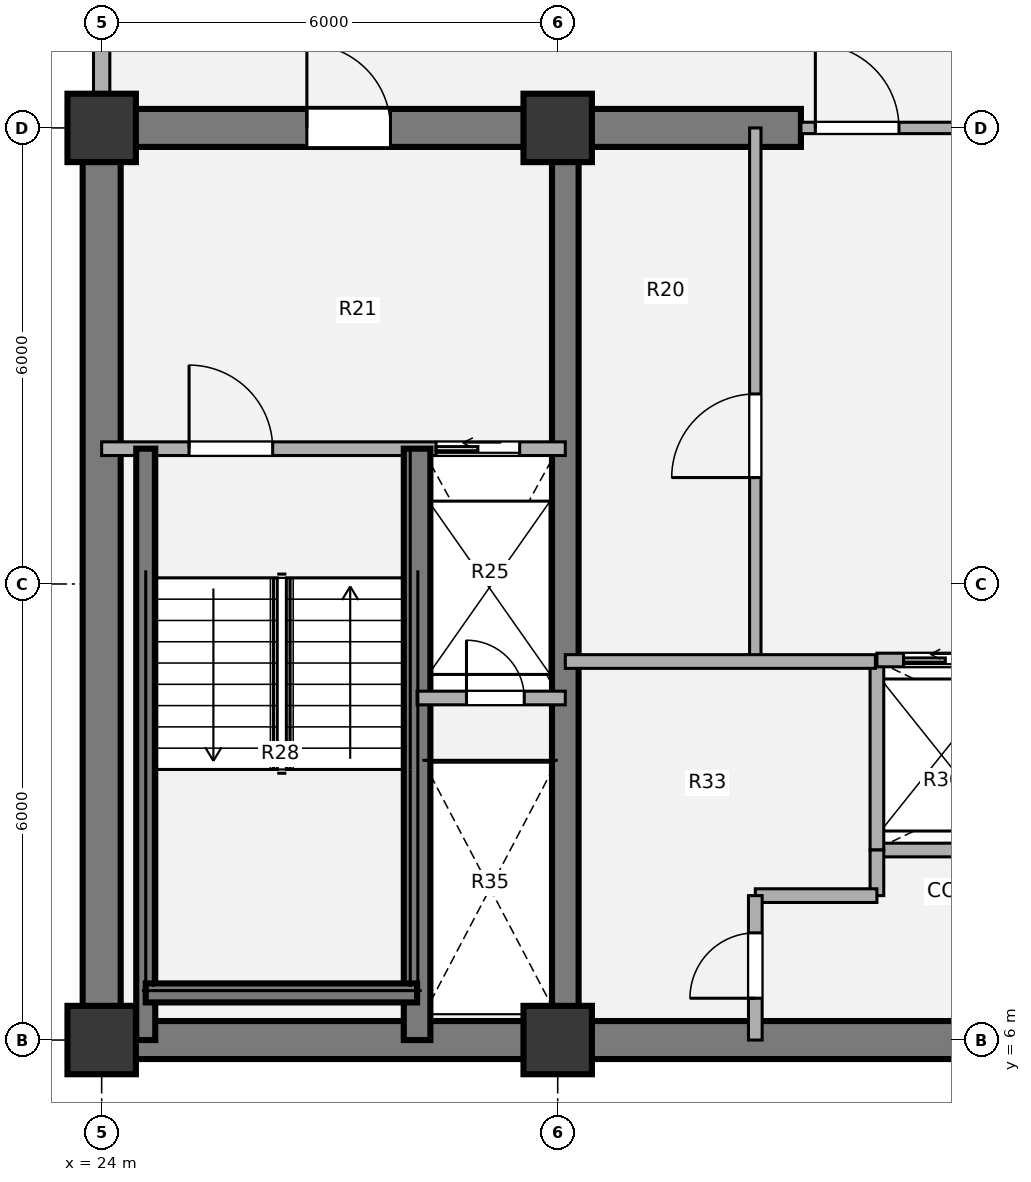
"""IFC4 building model, lengths in metres.
Left out: names, types, materials, properties, quantities, classifications, styles, units other than length and angle.
Written with IfcOpenShell. Run it as: python <this file> out.ifc"""

import sys

from ifc_helpers import new_model, si_unit, direction, frame, frame_2d, origin, origin_2d, place, context, subcontext, project, spatial, rectangle, extrude, source, transform, mapped, element, fill, save


model = new_model("IFC4")
c1 = context("Model", 3, precision=1e-05, world=origin(), true_north=direction((0.0, 1.0)))
c2 = subcontext(c1, "Body", "Model", "MODEL_VIEW")
j1 = project(units=[si_unit("LENGTHUNIT", "METRE"), si_unit("PLANEANGLEUNIT", "RADIAN")], contexts=[c1])
p1 = place(None, origin())
s1 = spatial("IfcSite", under=j1, at=p1, CompositionType="ELEMENT")
p2 = place(p1, origin())
s2 = spatial("IfcBuilding", under=s1, at=p2, CompositionType="ELEMENT")
p3 = place(p2, frame((0.0, 0.0, 104.94)))
s3 = spatial("IfcBuildingStorey", under=s2, at=p3, CompositionType="ELEMENT", Elevation=104.94)
m1 = source(origin(), c2, "Body", "SweptSolid", [
    extrude(rectangle(XDim=0.9, YDim=0.9, at=origin_2d()), origin(), (0.0, 0.0, 1.0), 3.78),
])
for number, where, z_axis, x_axis in (
    (1, (24.0, 6.0, 0.0), (0.0, 0.0, 1.0), (1.0, 0.0, 0.0)),
    (2, (30.0, 6.0, 0.0), (0.0, 0.0, 1.0), (1.0, 0.0, 0.0)),
    (3, (24.0, 18.0, 0.0), (0.0, 0.0, 1.0), (1.0, 0.0, 0.0)),
    (4, (30.0, 18.0, 0.0), (0.0, 0.0, 1.0), (1.0, 0.0, 0.0)),
):
    element("IfcColumn", number, at=place(p3, frame(where, z_axis=z_axis, x_axis=x_axis)), inside=s3, PredefinedType="COLUMN", context=c2, shape_type="MappedRepresentation", body=[
        mapped(m1, transform((0.0, 0.0, 0.0), x_axis=(1.0, 0.0, 0.0), y_axis=(0.0, 1.0, 0.0), z_axis=(0.0, 0.0, 1.0), scale=1.0)),
    ])
p4 = place(p3, frame((48.25, 6.0, 0.0), z_axis=(0.0, 0.0, 1.0), x_axis=(-1.0, 0.0, 0.0)))
e5 = element("IfcWall", 5, at=p4, inside=s3, PredefinedType="SHEAR", context=c2, shape_type="SweptSolid", body=[
    extrude(rectangle(XDim=24.5, YDim=0.5, at=frame_2d((12.25, 0.0))), origin(), (0.0, 0.0, 1.0), 3.78),
])
p5 = place(p3, frame((24.0, 6.0, 0.0), z_axis=(0.0, 0.0, 1.0), x_axis=(0.0, 1.0, 0.0)))
e6 = element("IfcWall", 6, at=p5, inside=s3, PredefinedType="SHEAR", context=c2, shape_type="SweptSolid", body=[
    extrude(rectangle(XDim=12.0, YDim=0.5, at=frame_2d((6.0, 0.0))), origin(), (0.0, 0.0, 1.0), 3.78),
])
p6 = place(p3, frame((23.75, 18.0, 0.0), z_axis=(0.0, 0.0, 1.0), x_axis=(1.0, 0.0, 0.0)))
e7 = element("IfcWall", 7, at=p6, inside=s3, PredefinedType="SHEAR", context=c2, shape_type="SweptSolid", body=[
    extrude(rectangle(XDim=9.45, YDim=0.5, at=frame_2d((4.725, 0.0))), origin(), (0.0, 0.0, 1.0), 3.78),
])
p7 = place(p6, frame((2.95, 0.0, 0.0)))
e8 = element("IfcOpeningElement", 8, at=p7, cuts=e7, PredefinedType="OPENING", context=c2, shape_type="SweptSolid", body=[
    extrude(rectangle(XDim=1.1, YDim=2.1, at=origin_2d()), frame((0.55, 0.26, 1.05), z_axis=(0.0, -1.0, 0.0), x_axis=(1.0, 0.0, 0.0)), (0.0, 0.0, 1.0), 0.52),
])
p8 = place(p3, frame((30.1, 6.0, 0.0), z_axis=(0.0, 0.0, 1.0), x_axis=(0.0, 1.0, 0.0)))
e9 = element("IfcWall", 9, at=p8, inside=s3, PredefinedType="SHEAR", context=c2, shape_type="SweptSolid", body=[
    extrude(rectangle(XDim=12.0, YDim=0.35, at=frame_2d((6.0, 0.0))), origin(), (0.0, 0.0, 1.0), 3.78),
])
p9 = place(p3, frame((24.0, 18.43, 0.0), z_axis=(0.0, 0.0, 1.0), x_axis=(0.0, 1.0, 0.0)))
e10 = element("IfcWall", 10, at=p9, inside=s3, PredefinedType="SOLIDWALL", context=c2, shape_type="SweptSolid", body=[
    extrude(rectangle(XDim=2.62, YDim=0.215, at=frame_2d((1.31, 0.0))), origin(), (0.0, 0.0, 1.0), 3.53),
])
p10 = place(p3, frame((32.6, 11.0, 0.0), z_axis=(0.0, 0.0, 1.0), x_axis=(0.0, 1.0, 0.0)))
e11 = element("IfcWall", 11, at=p10, inside=s3, PredefinedType="PARTITIONING", context=c2, shape_type="SweptSolid", body=[
    extrude(rectangle(XDim=7.0, YDim=0.15, at=frame_2d((3.5, 0.0))), origin(), (0.0, 0.0, 1.0), 3.5),
])
p11 = place(p10, frame((2.4, 0.0, 0.0)))
e12 = element("IfcOpeningElement", 12, at=p11, cuts=e11, PredefinedType="OPENING", context=c2, shape_type="SweptSolid", body=[
    extrude(rectangle(XDim=1.1, YDim=2.1, at=origin_2d()), frame((0.55, 0.085, 1.05), z_axis=(0.0, -1.0, 0.0), x_axis=(1.0, 0.0, 0.0)), (0.0, 0.0, 1.0), 0.17),
])
p12 = place(p3, frame((34.2, 8.5, 0.0), z_axis=(0.0, 0.0, 1.0), x_axis=(1.0, 0.0, 0.0)))
e13 = element("IfcWall", 13, at=p12, inside=s3, PredefinedType="PARTITIONING", context=c2, shape_type="SweptSolid", body=[
    extrude(rectangle(XDim=5.15, YDim=0.18, at=frame_2d((2.575, 0.0))), origin(), (0.0, 0.0, 1.0), 3.5),
])
p13 = place(p3, frame((34.2, 8.5, 0.0), z_axis=(0.0, 0.0, 1.0), x_axis=(0.0, 1.0, 0.0)))
e14 = element("IfcWall", 14, at=p13, inside=s3, PredefinedType="PARTITIONING", context=c2, shape_type="SweptSolid", body=[
    extrude(rectangle(XDim=2.5, YDim=0.18, at=frame_2d((1.25, 0.0))), origin(), (0.0, 0.0, 1.0), 3.5),
])
p14 = place(p3, frame((30.1, 10.98, 0.0), z_axis=(0.0, 0.0, 1.0), x_axis=(1.0, 0.0, 0.0)))
e15 = element("IfcWall", 15, at=p14, inside=s3, PredefinedType="PARTITIONING", context=c2, shape_type="SweptSolid", body=[
    extrude(rectangle(XDim=4.08, YDim=0.18, at=frame_2d((2.04, 0.0))), origin(), (0.0, 0.0, 1.0), 3.5),
])
p15 = place(p3, frame((34.2, 7.9, 0.0), z_axis=(0.0, 0.0, 1.0), x_axis=(0.0, 1.0, 0.0)))
e16 = element("IfcWall", 16, at=p15, inside=s3, PredefinedType="PARTITIONING", context=c2, shape_type="SweptSolid", body=[
    extrude(rectangle(XDim=0.6, YDim=0.18, at=frame_2d((0.3, 0.0))), origin(), (0.0, 0.0, 1.0), 3.5),
])
p16 = place(p3, frame((32.6, 7.9, 0.0), z_axis=(0.0, 0.0, 1.0), x_axis=(1.0, 0.0, 0.0)))
e17 = element("IfcWall", 17, at=p16, inside=s3, PredefinedType="PARTITIONING", context=c2, shape_type="SweptSolid", body=[
    extrude(rectangle(XDim=1.6, YDim=0.18, at=frame_2d((0.8, 0.0))), origin(), (0.0, 0.0, 1.0), 3.5),
])
p17 = place(p3, frame((32.6, 6.0, 0.0), z_axis=(0.0, 0.0, 1.0), x_axis=(0.0, 1.0, 0.0)))
e18 = element("IfcWall", 18, at=p17, inside=s3, PredefinedType="PARTITIONING", context=c2, shape_type="SweptSolid", body=[
    extrude(rectangle(XDim=1.9, YDim=0.18, at=frame_2d((0.95, 0.0))), origin(), (0.0, 0.0, 1.0), 3.5),
])
p18 = place(p17, frame((0.55, 0.0, 0.0)))
e19 = element("IfcOpeningElement", 19, at=p18, cuts=e18, PredefinedType="OPENING", context=c2, shape_type="SweptSolid", body=[
    extrude(rectangle(XDim=0.86, YDim=2.1, at=origin_2d()), frame((0.43, 0.1, 1.05), z_axis=(0.0, -1.0, 0.0), x_axis=(1.0, 0.0, 0.0)), (0.0, 0.0, 1.0), 0.2),
])
p19 = place(p3, frame((33.2, 18.0, 0.0), z_axis=(0.0, 0.0, 1.0), x_axis=(1.0, 0.0, 0.0)))
e20 = element("IfcWall", 20, at=p19, inside=s3, PredefinedType="PARTITIONING", context=c2, shape_type="SweptSolid", body=[
    extrude(rectangle(XDim=5.6, YDim=0.15, at=frame_2d((2.8, 0.0))), origin(), (0.0, 0.0, 1.0), 2.315),
])
p20 = place(p19, frame((0.19, 0.0, 0.0)))
e21 = element("IfcOpeningElement", 21, at=p20, cuts=e20, PredefinedType="OPENING", context=c2, shape_type="SweptSolid", body=[
    extrude(rectangle(XDim=1.1, YDim=2.1, at=origin_2d()), frame((0.55, 0.085, 1.05), z_axis=(0.0, -1.0, 0.0), x_axis=(1.0, 0.0, 0.0)), (0.0, 0.0, 1.0), 0.17),
])
p21 = place(p19, frame((4.31, 0.0, 0.0)))
e22 = element("IfcOpeningElement", 22, at=p21, cuts=e20, PredefinedType="OPENING", context=c2, shape_type="SweptSolid", body=[
    extrude(rectangle(XDim=1.1, YDim=2.1, at=origin_2d()), frame((0.55, 0.085, 1.05), z_axis=(0.0, -1.0, 0.0), x_axis=(1.0, 0.0, 0.0)), (0.0, 0.0, 1.0), 0.17),
])
p22 = place(p3, frame((24.0, 13.78, 0.0), z_axis=(0.0, 0.0, 1.0), x_axis=(1.0, 0.0, 0.0)))
e23 = element("IfcWall", 23, at=p22, inside=s3, PredefinedType="PARTITIONING", context=c2, shape_type="SweptSolid", body=[
    extrude(rectangle(XDim=6.1, YDim=0.18, at=frame_2d((3.05, 0.0))), origin(), (0.0, 0.0, 1.0), 3.5),
])
p23 = place(p22, frame((1.15, 0.0, 0.0)))
e24 = element("IfcOpeningElement", 24, at=p23, cuts=e23, PredefinedType="OPENING", context=c2, shape_type="SweptSolid", body=[
    extrude(rectangle(XDim=1.1, YDim=2.1, at=origin_2d()), frame((0.55, 0.1, 1.05), z_axis=(0.0, -1.0, 0.0), x_axis=(1.0, 0.0, 0.0)), (0.0, 0.0, 1.0), 0.2),
])
p24 = place(p22, frame((4.4, 0.0, 0.0)))
e25 = element("IfcOpeningElement", 25, at=p24, cuts=e23, PredefinedType="OPENING", context=c2, shape_type="SweptSolid", body=[
    extrude(rectangle(XDim=1.1, YDim=2.1, at=origin_2d()), frame((0.55, 0.1, 1.05), z_axis=(0.0, -1.0, 0.0), x_axis=(1.0, 0.0, 0.0)), (0.0, 0.0, 1.0), 0.2),
])
p25 = place(p3, frame((28.15, 6.0, 0.0), z_axis=(0.0, 0.0, 1.0), x_axis=(0.0, 1.0, 0.0)))
e26 = element("IfcWall", 26, at=p25, inside=s3, PredefinedType="SHEAR", context=c2, shape_type="SweptSolid", body=[
    extrude(rectangle(XDim=7.78, YDim=0.35, at=frame_2d((3.89, 0.0))), origin(), (0.0, 0.0, 1.0), 3.85),
])
p26 = place(p3, frame((24.58, 6.0, 0.0), z_axis=(0.0, 0.0, 1.0), x_axis=(0.0, 1.0, 0.0)))
e27 = element("IfcWall", 27, at=p26, inside=s3, PredefinedType="SHEAR", context=c2, shape_type="SweptSolid", body=[
    extrude(rectangle(XDim=7.78, YDim=0.25, at=frame_2d((3.89, 0.0))), origin(), (0.0, 0.0, 1.0), 3.85),
])
p27 = place(p3, frame((24.58, 6.62, 0.0), z_axis=(0.0, 0.0, 1.0), x_axis=(1.0, 0.0, 0.0)))
e28 = element("IfcWall", 28, at=p27, inside=s3, PredefinedType="SHEAR", context=c2, shape_type="SweptSolid", body=[
    extrude(rectangle(XDim=3.57, YDim=0.25, at=frame_2d((1.785, 0.0))), origin(), (0.0, 0.0, 1.0), 3.85),
])
p28 = place(p3, frame((28.15, 10.5, 0.0), z_axis=(0.0, 0.0, 1.0), x_axis=(1.0, 0.0, 0.0)))
e29 = element("IfcWall", 29, at=p28, inside=s3, PredefinedType="PARTITIONING", context=c2, shape_type="SweptSolid", body=[
    extrude(rectangle(XDim=1.95, YDim=0.18, at=frame_2d((0.975, 0.0))), origin(), (0.0, 0.0, 1.0), 3.5),
])
p29 = place(p28, frame((0.65, 0.0, 0.0)))
e30 = element("IfcOpeningElement", 30, at=p29, cuts=e29, PredefinedType="OPENING", context=c2, shape_type="SweptSolid", body=[
    extrude(rectangle(XDim=0.76, YDim=2.05, at=origin_2d()), frame((0.38, 0.1, 1.025), z_axis=(0.0, -1.0, 0.0), x_axis=(1.0, 0.0, 0.0)), (0.0, 0.0, 1.0), 0.2),
])
p30 = place(p3, frame((34.2, 11.0, 0.0), z_axis=(0.0, 0.0, 1.0), x_axis=(1.0, 0.0, 0.0)))
e31 = element("IfcWall", 31, at=p30, inside=s3, PredefinedType="PARTITIONING", context=c2, shape_type="SweptSolid", body=[
    extrude(rectangle(XDim=5.15, YDim=0.18, at=frame_2d((2.575, 0.0))), origin(), (0.0, 0.0, 1.0), 3.5),
])
p31 = place(p30, frame((0.35, 0.0, 0.0)))
e32 = element("IfcOpeningElement", 32, at=p31, cuts=e31, PredefinedType="OPENING", context=c2, shape_type="SweptSolid", body=[
    extrude(rectangle(XDim=1.1, YDim=2.1, at=origin_2d()), frame((0.55, 0.1, 1.05), z_axis=(0.0, -1.0, 0.0), x_axis=(1.0, 0.0, 0.0)), (0.0, 0.0, 1.0), 0.2),
])
p32 = place(p30, frame((2.05, 0.0, 0.0)))
e33 = element("IfcOpeningElement", 33, at=p32, cuts=e31, PredefinedType="OPENING", context=c2, shape_type="SweptSolid", body=[
    extrude(rectangle(XDim=1.1, YDim=2.1, at=origin_2d()), frame((0.55, 0.1, 1.05), z_axis=(0.0, -1.0, 0.0), x_axis=(1.0, 0.0, 0.0)), (0.0, 0.0, 1.0), 0.2),
])
p33 = place(p30, frame((3.7, 0.0, 0.0)))
e34 = element("IfcOpeningElement", 34, at=p33, cuts=e31, PredefinedType="OPENING", context=c2, shape_type="SweptSolid", body=[
    extrude(rectangle(XDim=1.1, YDim=2.1, at=origin_2d()), frame((0.55, 0.1, 1.05), z_axis=(0.0, -1.0, 0.0), x_axis=(1.0, 0.0, 0.0)), (0.0, 0.0, 1.0), 0.2),
])
m2 = source(origin(), c2, "Body", "SweptSolid", [
    extrude(rectangle(XDim=1.1, YDim=2.1, at=origin_2d()), frame((0.55, 0.025, 1.05), z_axis=(0.0, -1.0, 0.0), x_axis=(1.0, 0.0, 0.0)), (0.0, 0.0, 1.0), 0.05),
])
p34 = place(p11, origin())
e35 = element("IfcDoor", 35, at=p34, inside=s3, OperationType="SINGLE_SWING_LEFT", PredefinedType="DOOR", context=c2, shape_type="MappedRepresentation", body=[
    mapped(m2, transform((0.0, 0.0, 0.0), x_axis=(1.0, 0.0, 0.0), y_axis=(0.0, 1.0, 0.0), z_axis=(0.0, 0.0, 1.0), scale=1.0)),
])
fill(e12, e35)
m3 = source(origin(), c2, "Body", "SweptSolid", [
    extrude(rectangle(XDim=0.86, YDim=2.1, at=origin_2d()), frame((0.43, 0.025, 1.05), z_axis=(0.0, -1.0, 0.0), x_axis=(1.0, 0.0, 0.0)), (0.0, 0.0, 1.0), 0.05),
])
p35 = place(p18, origin())
e36 = element("IfcDoor", 36, at=p35, inside=s3, OperationType="SINGLE_SWING_LEFT", PredefinedType="DOOR", context=c2, shape_type="MappedRepresentation", body=[
    mapped(m3, transform((0.0, 0.0, 0.0), x_axis=(1.0, 0.0, 0.0), y_axis=(0.0, 1.0, 0.0), z_axis=(0.0, 0.0, 1.0), scale=1.0)),
])
fill(e19, e36)
m4 = source(origin(), c2, "Body", "SweptSolid", [
    extrude(rectangle(XDim=1.1, YDim=2.1, at=origin_2d()), frame((0.55, 0.025, 1.05), z_axis=(0.0, -1.0, 0.0), x_axis=(1.0, 0.0, 0.0)), (0.0, 0.0, 1.0), 0.05),
])
p36 = place(p20, origin())
e37 = element("IfcDoor", 37, at=p36, inside=s3, OperationType="SINGLE_SWING_LEFT", PredefinedType="DOOR", context=c2, shape_type="MappedRepresentation", body=[
    mapped(m4, transform((0.0, 0.0, 0.0), x_axis=(1.0, 0.0, 0.0), y_axis=(0.0, 1.0, 0.0), z_axis=(0.0, 0.0, 1.0), scale=1.0)),
])
fill(e21, e37)
m5 = source(origin(), c2, "Body", "SweptSolid", [
    extrude(rectangle(XDim=1.1, YDim=2.1, at=origin_2d()), frame((0.55, 0.025, 1.05), z_axis=(0.0, -1.0, 0.0), x_axis=(1.0, 0.0, 0.0)), (0.0, 0.0, 1.0), 0.05),
])
p37 = place(p23, origin())
e38 = element("IfcDoor", 38, at=p37, inside=s3, OperationType="SINGLE_SWING_LEFT", PredefinedType="DOOR", context=c2, shape_type="MappedRepresentation", body=[
    mapped(m5, transform((0.0, 0.0, 0.0), x_axis=(1.0, 0.0, 0.0), y_axis=(0.0, 1.0, 0.0), z_axis=(0.0, 0.0, 1.0), scale=1.0)),
])
fill(e24, e38)
m6 = source(origin(), c2, "Body", "SweptSolid", [
    extrude(rectangle(XDim=1.1, YDim=2.1, at=origin_2d()), frame((0.55, 0.025, 1.05), z_axis=(0.0, -1.0, 0.0), x_axis=(1.0, 0.0, 0.0)), (0.0, 0.0, 1.0), 0.05),
])
p38 = place(p24, origin())
e39 = element("IfcDoor", 39, at=p38, inside=s3, OperationType="SLIDING_TO_LEFT", PredefinedType="DOOR", context=c2, shape_type="MappedRepresentation", body=[
    mapped(m6, transform((0.0, 0.0, 0.0), x_axis=(1.0, 0.0, 0.0), y_axis=(0.0, 1.0, 0.0), z_axis=(0.0, 0.0, 1.0), scale=1.0)),
])
fill(e25, e39)
m7 = source(origin(), c2, "Body", "SweptSolid", [
    extrude(rectangle(XDim=0.76, YDim=2.05, at=origin_2d()), frame((0.38, 0.025, 1.025), z_axis=(0.0, -1.0, 0.0), x_axis=(1.0, 0.0, 0.0)), (0.0, 0.0, 1.0), 0.05),
])
p39 = place(p29, origin())
e40 = element("IfcDoor", 40, at=p39, inside=s3, OperationType="SINGLE_SWING_LEFT", PredefinedType="DOOR", context=c2, shape_type="MappedRepresentation", body=[
    mapped(m7, transform((0.0, 0.0, 0.0), x_axis=(1.0, 0.0, 0.0), y_axis=(0.0, 1.0, 0.0), z_axis=(0.0, 0.0, 1.0), scale=1.0)),
])
fill(e30, e40)
p40 = place(p7, origin())
e41 = element("IfcDoor", 41, at=p40, inside=s3, OperationType="SINGLE_SWING_LEFT", PredefinedType="DOOR", context=c2, shape_type="MappedRepresentation", body=[
    mapped(m4, transform((0.0, 0.0, 0.0), x_axis=(1.0, 0.0, 0.0), y_axis=(0.0, 1.0, 0.0), z_axis=(0.0, 0.0, 1.0), scale=1.0)),
])
fill(e8, e41)
p41 = place(p31, origin())
e42 = element("IfcDoor", 42, at=p41, inside=s3, OperationType="SLIDING_TO_LEFT", PredefinedType="DOOR", context=c2, shape_type="MappedRepresentation", body=[
    mapped(m6, transform((0.0, 0.0, 0.0), x_axis=(1.0, 0.0, 0.0), y_axis=(0.0, 1.0, 0.0), z_axis=(0.0, 0.0, 1.0), scale=1.0)),
])
fill(e32, e42)
save(model, sys.argv[1])
